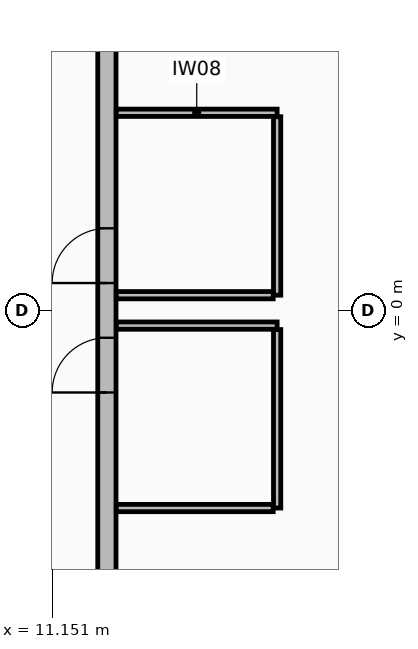
"""IFC4 building model, lengths in metres.
Left out: names, types, materials, properties, quantities, classifications, styles, units other than length and angle.
Written with IfcOpenShell. Run it as: python <this file> out.ifc"""

import sys

from ifc_helpers import new_model, si_unit, direction, frame, frame_2d, origin, place, context, subcontext, project, spatial, rectangle, extrude, element, fill, save


model = new_model("IFC4")
c1 = context("Model", 3, precision=1e-05, world=origin(), true_north=direction((0.0, 1.0)))
c2 = subcontext(c1, "Body", "Model", "MODEL_VIEW")
j1 = project(units=[si_unit("LENGTHUNIT", "METRE"), si_unit("PLANEANGLEUNIT", "RADIAN")], contexts=[c1])
p1 = place(None, origin())
s1 = spatial("IfcSite", under=j1, at=p1, CompositionType="ELEMENT")
p2 = place(p1, origin())
s2 = spatial("IfcBuilding", under=s1, at=p2, CompositionType="ELEMENT")
p3 = place(p2, frame((0.0, 0.0, 222.05)))
s3 = spatial("IfcBuildingStorey", under=s2, at=p3, CompositionType="ELEMENT", Elevation=222.05)
p4 = place(p3, frame((12.05, -10.75, 0.0), z_axis=(0.0, 0.0, 1.0), x_axis=(0.0, 1.0, 0.0)))
e1 = element("IfcWall", 1, at=p4, inside=s3, PredefinedType="STANDARD", context=c2, shape_type="SweptSolid", body=[
    extrude(rectangle(XDim=21.5, YDim=0.3, at=frame_2d((10.75, 0.0))), origin(), (0.0, 0.0, 1.0), 2.505),
])
p5 = place(p4, frame((11.2, 0.0, 0.0)))
e2 = element("IfcOpeningElement", 2, at=p5, cuts=e1, PredefinedType="OPENING", context=c2, shape_type="SweptSolid", body=[
    extrude(rectangle(XDim=0.9, YDim=2.1, at=frame_2d((0.45, 1.05))), frame((0.0, 0.16, 0.0), z_axis=(0.0, -1.0, 0.0), x_axis=(1.0, 0.0, 0.0)), (0.0, 0.0, 1.0), 0.32),
])
p6 = place(p4, frame((9.4, 0.0, 0.0)))
e3 = element("IfcOpeningElement", 3, at=p6, cuts=e1, PredefinedType="OPENING", context=c2, shape_type="SweptSolid", body=[
    extrude(rectangle(XDim=0.9, YDim=2.1, at=frame_2d((0.45, 1.05))), frame((0.0, 0.16, 0.0), z_axis=(0.0, -1.0, 0.0), x_axis=(1.0, 0.0, 0.0)), (0.0, 0.0, 1.0), 0.32),
])
p7 = place(p3, frame((12.205, 3.25, 0.0), z_axis=(0.0, 0.0, 1.0), x_axis=(1.0, 0.0, 0.0)))
e4 = element("IfcWall", 4, at=p7, inside=s3, PredefinedType="PARTITIONING", context=c2, shape_type="SweptSolid", body=[
    extrude(rectangle(XDim=2.645, YDim=0.12, at=frame_2d((1.323, 0.0))), origin(), (0.0, 0.0, 1.0), 4.505),
])
p8 = place(p3, frame((14.85, 3.185, 0.0), z_axis=(0.0, 0.0, 1.0), x_axis=(0.0, -1.0, 0.0)))
e5 = element("IfcWall", 5, at=p8, inside=s3, PredefinedType="PARTITIONING", context=c2, shape_type="SweptSolid", body=[
    extrude(rectangle(XDim=2.935, YDim=0.12, at=frame_2d((1.468, 0.0))), origin(), (0.0, 0.0, 1.0), 4.505),
])
p9 = place(p3, frame((14.785, 0.25, 0.0), z_axis=(0.0, 0.0, 1.0), x_axis=(-1.0, 0.0, 0.0)))
e6 = element("IfcWall", 6, at=p9, inside=s3, PredefinedType="PARTITIONING", context=c2, shape_type="SweptSolid", body=[
    extrude(rectangle(XDim=2.58, YDim=0.12, at=frame_2d((1.29, 0.0))), origin(), (0.0, 0.0, 1.0), 4.81),
])
p10 = place(p3, frame((12.205, -0.25, 0.0), z_axis=(0.0, 0.0, 1.0), x_axis=(1.0, 0.0, 0.0)))
e7 = element("IfcWall", 7, at=p10, inside=s3, PredefinedType="PARTITIONING", context=c2, shape_type="SweptSolid", body=[
    extrude(rectangle(XDim=2.645, YDim=0.12, at=frame_2d((1.323, 0.0))), origin(), (0.0, 0.0, 1.0), 4.81),
])
p11 = place(p3, frame((14.85, -0.315, 0.0), z_axis=(0.0, 0.0, 1.0), x_axis=(0.0, -1.0, 0.0)))
e8 = element("IfcWall", 8, at=p11, inside=s3, PredefinedType="PARTITIONING", context=c2, shape_type="SweptSolid", body=[
    extrude(rectangle(XDim=2.935, YDim=0.12, at=frame_2d((1.468, 0.0))), origin(), (0.0, 0.0, 1.0), 2.605),
])
p12 = place(p3, frame((14.785, -3.25, 0.0), z_axis=(0.0, 0.0, 1.0), x_axis=(-1.0, 0.0, 0.0)))
e9 = element("IfcWall", 9, at=p12, inside=s3, PredefinedType="PARTITIONING", context=c2, shape_type="SweptSolid", body=[
    extrude(rectangle(XDim=2.58, YDim=0.12, at=frame_2d((1.29, 0.0))), origin(), (0.0, 0.0, 1.0), 2.605),
])
p13 = place(p5, origin())
e10 = element("IfcDoor", 10, at=p13, inside=s3, OperationType="SINGLE_SWING_LEFT", PredefinedType="DOOR", context=c2, shape_type="SweptSolid", body=[
    extrude(rectangle(XDim=0.9, YDim=2.1, at=frame_2d((0.45, 1.05))), frame((0.0, 0.025, 0.0), z_axis=(0.0, -1.0, 0.0), x_axis=(1.0, 0.0, 0.0)), (0.0, 0.0, 1.0), 0.05),
])
fill(e2, e10)
p14 = place(p6, origin())
e11 = element("IfcDoor", 11, at=p14, inside=s3, OperationType="SINGLE_SWING_LEFT", PredefinedType="DOOR", context=c2, shape_type="SweptSolid", body=[
    extrude(rectangle(XDim=0.9, YDim=2.1, at=frame_2d((0.45, 1.05))), frame((0.0, 0.025, 0.0), z_axis=(0.0, -1.0, 0.0), x_axis=(1.0, 0.0, 0.0)), (0.0, 0.0, 1.0), 0.05),
])
fill(e3, e11)
save(model, sys.argv[1])
